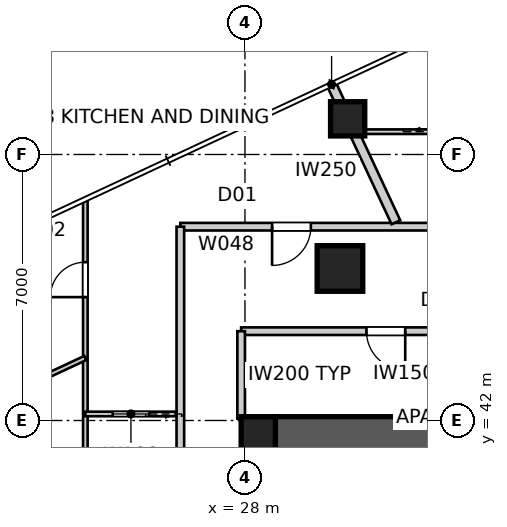
"""IFC4 building model, lengths in metres.
Left out: names, types, materials, properties, quantities, classifications, styles, units other than length and angle.
Written with IfcOpenShell. Run it as: python <this file> out.ifc"""

import sys

from ifc_helpers import new_model, si_unit, direction, frame, frame_2d, origin, origin_2d, place, context, subcontext, project, spatial, polyline, rectangle, outline, extrude, element, fill, save


model = new_model("IFC4")
c1 = context("Model", 3, precision=1e-05, world=origin(), true_north=direction((0.0, 1.0)))
c2 = subcontext(c1, "Body", "Model", "MODEL_VIEW")
j1 = project(units=[si_unit("LENGTHUNIT", "METRE"), si_unit("PLANEANGLEUNIT", "RADIAN")], contexts=[c1])
p1 = place(None, origin())
s1 = spatial("IfcSite", under=j1, at=p1, CompositionType="ELEMENT")
p2 = place(p1, origin())
s2 = spatial("IfcBuilding", under=s1, at=p2, CompositionType="ELEMENT")
p3 = place(p2, frame((0.0, 0.0, 186.2)))
s3 = spatial("IfcBuildingStorey", under=s2, at=p3, CompositionType="ELEMENT", Elevation=186.2)
p4 = place(p3, frame((28.8, 41.65, 0.0), z_axis=(0.0, 0.0, 1.0), x_axis=(1.0, 0.0, 0.0)))
e1 = element("IfcWall", 1, at=p4, inside=s3, PredefinedType="SHEAR", context=c2, shape_type="SweptSolid", body=[
    extrude(outline(polyline([(0.0, -0.45), (22.4, -0.45), (22.4, -0.025), (22.85, -0.025), (22.85, 0.025), (22.4, 0.025), (22.4, 0.45), (0.0, 0.45), (0.0, 0.025), (-0.45, 0.025), (-0.45, -0.025), (0.0, -0.025), (0.0, -0.45)])), origin(), (0.0, 0.0, 1.0), 3.4),
])
p5 = place(p3, frame((28.35, 41.2, 0.0), z_axis=(0.0, 0.0, 1.0), x_axis=(0.0, -1.0, 0.0)))
e2 = element("IfcWall", 2, at=p5, inside=s3, PredefinedType="SHEAR", context=c2, shape_type="SweptSolid", body=[
    extrude(outline(polyline([(0.0, -0.45), (22.4, -0.45), (22.4, -0.025), (22.85, -0.025), (22.85, 0.025), (22.4, 0.025), (22.4, 0.45), (0.0, 0.45), (0.0, 0.025), (-0.45, 0.025), (-0.45, -0.025), (0.0, -0.025), (0.0, -0.45)])), origin(), (0.0, 0.0, 1.0), 3.4),
])
p6 = place(p5, frame((11.14, 0.0, 0.0)))
e3 = element("IfcOpeningElement", 3, at=p6, cuts=e2, PredefinedType="OPENING", context=c2, shape_type="SweptSolid", body=[
    extrude(rectangle(XDim=1.02, YDim=2.4, at=frame_2d((0.51, 1.2))), frame((0.0, 0.46, 0.0), z_axis=(0.0, -1.0, 0.0), x_axis=(1.0, 0.0, 0.0)), (0.0, 0.0, 1.0), 0.92),
])
for number, where, z_axis, x_axis in (
    (4, (28.35, 41.65, 0.0), (0.0, 0.0, 1.0), (1.0, 0.0, 0.0)),
    (5, (30.702, 49.939, 0.0), (0.0, 0.0, 1.0), (1.0, 0.0, 0.0)),
):
    element("IfcColumn", number, at=place(p3, frame(where, z_axis=z_axis, x_axis=x_axis)), inside=s3, PredefinedType="COLUMN", context=c2, shape_type="SweptSolid", body=[
        extrude(rectangle(XDim=0.9, YDim=0.9, at=origin_2d()), origin(), (0.0, 0.0, 1.0), 3.4),
    ])
p7 = place(p3, frame((30.5, 46.0, 0.0), z_axis=(0.0, 0.0, 1.0), x_axis=(1.0, 0.0, 0.0)))
e6 = element("IfcColumn", 6, at=p7, inside=s3, PredefinedType="COLUMN", context=c2, shape_type="SweptSolid", body=[
    extrude(rectangle(XDim=1.2, YDim=1.2, at=origin_2d()), origin(), (0.0, 0.0, 1.0), 3.4),
])
p8 = place(p3, frame((33.692, 47.1, 0.0), z_axis=(0.0, 0.0, 1.0), x_axis=(-1.0, 0.0, 0.0)))
e7 = element("IfcWall", 7, at=p8, inside=s3, PredefinedType="PARTITIONING", context=c2, shape_type="SweptSolid", body=[
    extrude(rectangle(XDim=7.392, YDim=0.2, at=frame_2d((3.696, 0.0))), origin(), (0.0, 0.0, 1.0), 3.25),
])
p9 = place(p8, frame((3.957, 0.0, 0.0)))
e8 = element("IfcOpeningElement", 8, at=p9, cuts=e7, PredefinedType="OPENING", context=c2, shape_type="SweptSolid", body=[
    extrude(rectangle(XDim=1.02, YDim=2.34, at=frame_2d((0.51, 1.17))), frame((0.0, 0.11, 0.0), z_axis=(0.0, -1.0, 0.0), x_axis=(1.0, 0.0, 0.0)), (0.0, 0.0, 1.0), 0.22),
])
p10 = place(p3, frame((26.3, 47.1, 0.0), z_axis=(0.0, 0.0, 1.0), x_axis=(0.0, -1.0, 0.0)))
e9 = element("IfcWall", 9, at=p10, inside=s3, PredefinedType="PARTITIONING", context=c2, shape_type="SweptSolid", body=[
    extrude(rectangle(XDim=33.8, YDim=0.2, at=frame_2d((16.9, 0.0))), origin(), (0.0, 0.0, 1.0), 3.25),
])
p11 = place(p10, frame((15.449, 0.0, 0.0)))
e10 = element("IfcOpeningElement", 10, at=p11, cuts=e9, PredefinedType="OPENING", context=c2, shape_type="SweptSolid", body=[
    extrude(rectangle(XDim=1.02, YDim=2.34, at=frame_2d((0.51, 1.17))), frame((0.0, 0.11, 0.0), z_axis=(0.0, -1.0, 0.0), x_axis=(1.0, 0.0, 0.0)), (0.0, 0.0, 1.0), 0.22),
])
p12 = place(p10, frame((30.883, 0.0, 0.0)))
e11 = element("IfcOpeningElement", 11, at=p12, cuts=e9, PredefinedType="OPENING", context=c2, shape_type="SweptSolid", body=[
    extrude(rectangle(XDim=1.02, YDim=2.34, at=frame_2d((0.51, 1.17))), frame((0.0, 0.11, 0.0), z_axis=(0.0, -1.0, 0.0), x_axis=(1.0, 0.0, 0.0)), (0.0, 0.0, 1.0), 0.22),
])
p13 = place(p3, frame((30.28, 50.845, 0.0), z_axis=(0.0, 0.0, 1.0), x_axis=(0.422605017068, -0.906313963011, 0.0)))
e12 = element("IfcWall", 12, at=p13, inside=s3, PredefinedType="PARTITIONING", context=c2, shape_type="SweptSolid", body=[
    extrude(rectangle(XDim=4.003, YDim=0.25, at=frame_2d((2.002, 0.0))), origin(), (0.0, 0.0, 1.0), 3.25),
])
p14 = place(p3, frame((52.1, 44.35, 0.0), z_axis=(0.0, 0.0, 1.0), x_axis=(-1.0, 0.0, 0.0)))
e13 = element("IfcWall", 13, at=p14, inside=s3, PredefinedType="PARTITIONING", context=c2, shape_type="SweptSolid", body=[
    extrude(rectangle(XDim=24.2, YDim=0.2, at=frame_2d((12.1, 0.0))), origin(), (0.0, 0.0, 1.0), 3.25),
])
p15 = place(p14, frame((12.437, 0.0, 0.0)))
e14 = element("IfcOpeningElement", 14, at=p15, cuts=e13, PredefinedType="OPENING", context=c2, shape_type="SweptSolid", body=[
    extrude(rectangle(XDim=1.02, YDim=2.1, at=frame_2d((0.51, 1.05))), frame((0.0, 0.11, 0.0), z_axis=(0.0, -1.0, 0.0), x_axis=(1.0, 0.0, 0.0)), (0.0, 0.0, 1.0), 0.22),
])
p16 = place(p14, frame((3.544, 0.0, 0.0)))
e15 = element("IfcOpeningElement", 15, at=p16, cuts=e13, PredefinedType="OPENING", context=c2, shape_type="SweptSolid", body=[
    extrude(rectangle(XDim=1.02, YDim=2.1, at=frame_2d((0.51, 1.05))), frame((0.0, 0.11, 0.0), z_axis=(0.0, -1.0, 0.0), x_axis=(1.0, 0.0, 0.0)), (0.0, 0.0, 1.0), 0.22),
])
p17 = place(p14, frame((19.883, 0.0, 0.0)))
e16 = element("IfcOpeningElement", 16, at=p17, cuts=e13, PredefinedType="OPENING", context=c2, shape_type="SweptSolid", body=[
    extrude(rectangle(XDim=1.02, YDim=2.1, at=frame_2d((0.51, 1.05))), frame((0.0, 0.11, 0.0), z_axis=(0.0, -1.0, 0.0), x_axis=(1.0, 0.0, 0.0)), (0.0, 0.0, 1.0), 0.22),
])
p18 = place(p3, frame((27.9, 44.35, 0.0), z_axis=(0.0, 0.0, 1.0), x_axis=(0.0, -1.0, 0.0)))
e17 = element("IfcWall", 17, at=p18, inside=s3, PredefinedType="PARTITIONING", context=c2, shape_type="SweptSolid", body=[
    extrude(rectangle(XDim=2.3, YDim=0.2, at=frame_2d((1.15, 0.0))), origin(), (0.0, 0.0, 1.0), 3.25),
])
p19 = place(p3, frame((23.8, 17.205, 0.0), z_axis=(0.0, 0.0, 1.0), x_axis=(0.0, 1.0, 0.0)))
e18 = element("IfcWall", 18, at=p19, inside=s3, PredefinedType="PARTITIONING", context=c2, shape_type="SweptSolid", body=[
    extrude(rectangle(XDim=30.574, YDim=0.12, at=frame_2d((15.287, 0.0))), origin(), (0.0, 0.0, 1.0), 2.55),
])
p20 = place(p19, frame((12.857, 0.0, 0.0)))
e19 = element("IfcOpeningElement", 19, at=p20, cuts=e18, PredefinedType="OPENING", context=c2, shape_type="SweptSolid", body=[
    extrude(rectangle(XDim=0.92, YDim=2.34, at=frame_2d((0.46, 1.17))), frame((0.0, 0.07, 0.0), z_axis=(0.0, -1.0, 0.0), x_axis=(1.0, 0.0, 0.0)), (0.0, 0.0, 1.0), 0.14),
])
p21 = place(p19, frame((28.042, 0.0, 0.0)))
e20 = element("IfcOpeningElement", 20, at=p21, cuts=e18, PredefinedType="OPENING", context=c2, shape_type="SweptSolid", body=[
    extrude(rectangle(XDim=0.92, YDim=2.34, at=frame_2d((0.46, 1.17))), frame((0.0, 0.07, 0.0), z_axis=(0.0, -1.0, 0.0), x_axis=(1.0, 0.0, 0.0)), (0.0, 0.0, 1.0), 0.14),
])
p22 = place(p19, frame((20.655, 0.0, 0.0)))
e21 = element("IfcOpeningElement", 21, at=p22, cuts=e18, PredefinedType="OPENING", context=c2, shape_type="SweptSolid", body=[
    extrude(rectangle(XDim=0.96, YDim=2.1, at=frame_2d((0.48, 1.05))), frame((0.0, 0.07, 0.0), z_axis=(0.0, -1.0, 0.0), x_axis=(1.0, 0.0, 0.0)), (0.0, 0.0, 1.0), 0.14),
])
p23 = place(p3, frame((30.86, 49.6, 0.0), z_axis=(0.0, 0.0, 1.0), x_axis=(1.0, 0.0, 0.0)))
e22 = element("IfcWall", 22, at=p23, inside=s3, PredefinedType="PARTITIONING", context=c2, shape_type="SweptSolid", body=[
    extrude(rectangle(XDim=25.333, YDim=0.12, at=frame_2d((12.667, 0.0))), origin(), (0.0, 0.0, 1.0), 3.25),
])
p24 = place(p23, frame((20.877, 0.0, 0.0)))
e23 = element("IfcOpeningElement", 23, at=p24, cuts=e22, PredefinedType="OPENING", context=c2, shape_type="SweptSolid", body=[
    extrude(rectangle(XDim=0.92, YDim=2.34, at=frame_2d((0.46, 1.17))), frame((0.0, 0.07, 0.0), z_axis=(0.0, -1.0, 0.0), x_axis=(1.0, 0.0, 0.0)), (0.0, 0.0, 1.0), 0.14),
])
p25 = place(p23, frame((12.623, 0.0, 0.0)))
e24 = element("IfcOpeningElement", 24, at=p25, cuts=e22, PredefinedType="OPENING", context=c2, shape_type="SweptSolid", body=[
    extrude(rectangle(XDim=0.96, YDim=2.1, at=frame_2d((0.48, 1.05))), frame((0.0, 0.07, 0.0), z_axis=(0.0, -1.0, 0.0), x_axis=(1.0, 0.0, 0.0)), (0.0, 0.0, 1.0), 0.14),
])
p26 = place(p23, frame((7.802, 0.0, 0.0)))
e25 = element("IfcOpeningElement", 25, at=p26, cuts=e22, PredefinedType="OPENING", context=c2, shape_type="SweptSolid", body=[
    extrude(rectangle(XDim=0.96, YDim=2.1, at=frame_2d((0.48, 1.05))), frame((0.0, 0.07, 0.0), z_axis=(0.0, -1.0, 0.0), x_axis=(1.0, 0.0, 0.0)), (0.0, 0.0, 1.0), 0.14),
])
p27 = place(p23, frame((2.168, 0.0, 0.0)))
e26 = element("IfcOpeningElement", 26, at=p27, cuts=e22, PredefinedType="OPENING", context=c2, shape_type="SweptSolid", body=[
    extrude(rectangle(XDim=0.96, YDim=2.1, at=frame_2d((0.48, 1.05))), frame((0.0, 0.07, 0.0), z_axis=(0.0, -1.0, 0.0), x_axis=(1.0, 0.0, 0.0)), (0.0, 0.0, 1.0), 0.14),
])
p28 = place(p3, frame((26.2, 42.172, 0.0), z_axis=(0.0, 0.0, 1.0), x_axis=(-1.0, 0.0, 0.0)))
e27 = element("IfcWall", 27, at=p28, inside=s3, PredefinedType="PARTITIONING", context=c2, shape_type="SweptSolid", body=[
    extrude(rectangle(XDim=2.4, YDim=0.12, at=frame_2d((1.2, 0.0))), origin(), (0.0, 0.0, 1.0), 3.25),
])
p29 = place(p28, frame((0.72, 0.0, 0.0)))
e28 = element("IfcOpeningElement", 28, at=p29, cuts=e27, PredefinedType="OPENING", context=c2, shape_type="SweptSolid", body=[
    extrude(rectangle(XDim=0.96, YDim=2.1, at=frame_2d((0.48, 1.05))), frame((0.0, 0.07, 0.0), z_axis=(0.0, -1.0, 0.0), x_axis=(1.0, 0.0, 0.0)), (0.0, 0.0, 1.0), 0.14),
])
p30 = place(p3, frame((14.697, 39.4, 0.0), z_axis=(0.0, 0.0, 1.0), x_axis=(0.906300466163, 0.422633961049, 0.0)))
e29 = element("IfcWall", 29, at=p30, inside=s3, PredefinedType="PARTITIONING", context=c2, shape_type="SweptSolid", body=[
    extrude(rectangle(XDim=10.044, YDim=0.12, at=frame_2d((5.022, 0.0))), origin(), (0.0, 0.0, 1.0), 3.25),
])
p31 = place(p30, frame((1.9, 0.0, 0.0)))
e30 = element("IfcOpeningElement", 30, at=p31, cuts=e29, PredefinedType="OPENING", context=c2, shape_type="SweptSolid", body=[
    extrude(rectangle(XDim=0.92, YDim=2.34, at=frame_2d((0.46, 1.17))), frame((0.0, 0.07, 0.0), z_axis=(0.0, -1.0, 0.0), x_axis=(1.0, 0.0, 0.0)), (0.0, 0.0, 1.0), 0.14),
])
p32 = place(p17, origin())
e31 = element("IfcDoor", 31, at=p32, inside=s3, OperationType="SINGLE_SWING_LEFT", PredefinedType="DOOR", context=c2, shape_type="SweptSolid", body=[
    extrude(rectangle(XDim=1.02, YDim=2.1, at=frame_2d((0.51, 1.05))), frame((0.0, 0.025, 0.0), z_axis=(0.0, -1.0, 0.0), x_axis=(1.0, 0.0, 0.0)), (0.0, 0.0, 1.0), 0.05),
])
fill(e16, e31)
p33 = place(p9, origin())
e32 = element("IfcDoor", 32, at=p33, inside=s3, OperationType="SINGLE_SWING_RIGHT", PredefinedType="DOOR", context=c2, shape_type="SweptSolid", body=[
    extrude(rectangle(XDim=1.02, YDim=2.34, at=frame_2d((0.51, 1.17))), frame((0.0, 0.025, 0.0), z_axis=(0.0, -1.0, 0.0), x_axis=(1.0, 0.0, 0.0)), (0.0, 0.0, 1.0), 0.05),
])
fill(e8, e32)
p34 = place(p21, origin())
e33 = element("IfcDoor", 33, at=p34, inside=s3, OperationType="SINGLE_SWING_LEFT", PredefinedType="DOOR", context=c2, shape_type="SweptSolid", body=[
    extrude(rectangle(XDim=0.92, YDim=2.34, at=frame_2d((0.46, 1.17))), frame((0.0, 0.025, 0.0), z_axis=(0.0, -1.0, 0.0), x_axis=(1.0, 0.0, 0.0)), (0.0, 0.0, 1.0), 0.05),
])
fill(e20, e33)
p35 = place(p29, origin())
e34 = element("IfcDoor", 34, at=p35, inside=s3, OperationType="SLIDING_TO_LEFT", PredefinedType="DOOR", context=c2, shape_type="SweptSolid", body=[
    extrude(rectangle(XDim=0.96, YDim=2.1, at=frame_2d((0.48, 1.05))), frame((0.0, 0.025, 0.0), z_axis=(0.0, -1.0, 0.0), x_axis=(1.0, 0.0, 0.0)), (0.0, 0.0, 1.0), 0.05),
])
fill(e28, e34)
save(model, sys.argv[1])
